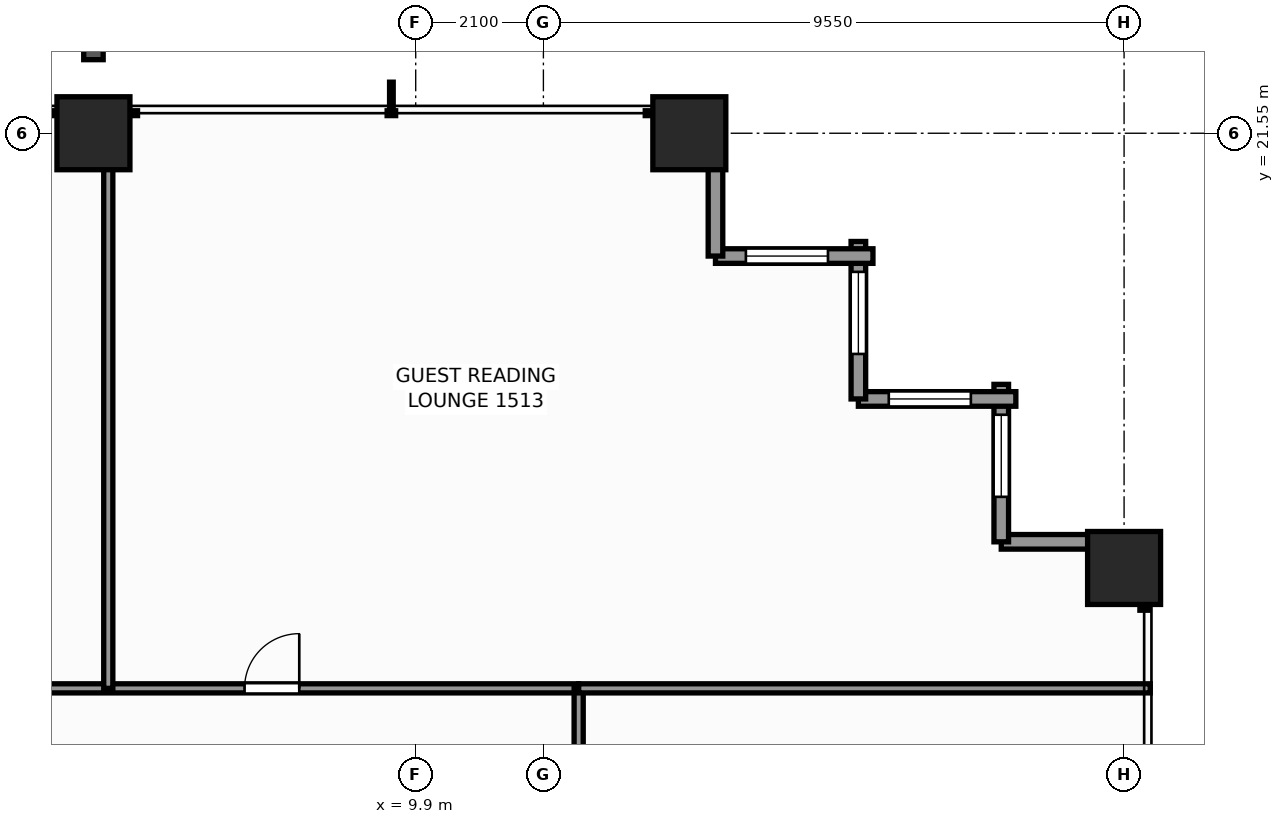
"""IFC4 building model, lengths in metres.
Left out: names, types, materials, properties, quantities, classifications, styles, units other than length and angle.
Written with IfcOpenShell. Run it as: python <this file> out.ifc"""

import sys

from ifc_helpers import new_model, si_unit, direction, frame, frame_2d, origin, origin_2d, place, context, subcontext, project, spatial, rectangle, extrude, element, fill, save


model = new_model("IFC4")
c1 = context("Model", 3, precision=1e-05, world=origin(), true_north=direction((0.0, 1.0)))
c2 = subcontext(c1, "Body", "Model", "MODEL_VIEW")
j1 = project(units=[si_unit("LENGTHUNIT", "METRE"), si_unit("PLANEANGLEUNIT", "RADIAN")], contexts=[c1])
p1 = place(None, origin())
s1 = spatial("IfcSite", under=j1, at=p1, CompositionType="ELEMENT")
p2 = place(p1, origin())
s2 = spatial("IfcBuilding", under=s1, at=p2, CompositionType="ELEMENT")
p3 = place(p2, frame((0.0, 0.0, 53.5)))
s3 = spatial("IfcBuildingStorey", under=s2, at=p3, CompositionType="ELEMENT", Elevation=53.5)
for number, where, z_axis, x_axis in (
    (1, (4.6, 21.55, 0.0), (0.0, 0.0, 1.0), (1.0, 0.0, 0.0)),
    (2, (14.4, 21.55, 0.0), (0.0, 0.0, 1.0), (1.0, 0.0, 0.0)),
    (3, (21.55, 14.4, 0.0), (0.0, 0.0, 1.0), (1.0, 0.0, 0.0)),
):
    element("IfcColumn", number, at=place(p3, frame(where, z_axis=z_axis, x_axis=x_axis)), inside=s3, PredefinedType="COLUMN", context=c2, shape_type="SweptSolid", body=[
        extrude(rectangle(XDim=1.2, YDim=1.2, at=origin_2d()), origin(), (0.0, 0.0, 1.0), 3.3),
    ])
p4 = place(p3, frame((19.53, 14.83, 0.0), z_axis=(0.0, 0.0, 1.0), x_axis=(1.0, 0.0, 0.0)))
e4 = element("IfcWall", 4, at=p4, inside=s3, PredefinedType="STANDARD", context=c2, shape_type="SweptSolid", body=[
    extrude(rectangle(XDim=2.59, YDim=0.24, at=frame_2d((1.295, 0.0))), origin(), (0.0, 0.0, 1.0), 2.439),
])
p5 = place(p3, frame((19.53, 17.42, 0.0), z_axis=(0.0, 0.0, 1.0), x_axis=(0.0, -1.0, 0.0)))
e5 = element("IfcWall", 5, at=p5, inside=s3, PredefinedType="STANDARD", context=c2, shape_type="SweptSolid", body=[
    extrude(rectangle(XDim=2.59, YDim=0.24, at=frame_2d((1.295, 0.0))), origin(), (0.0, 0.0, 1.0), 2.439),
])
p6 = place(p5, frame((0.5, 0.0, 0.65)))
e6 = element("IfcOpeningElement", 6, at=p6, cuts=e5, PredefinedType="OPENING", context=c2, shape_type="SweptSolid", body=[
    extrude(rectangle(XDim=1.35, YDim=1.55, at=frame_2d((0.675, 0.775))), frame((0.0, 0.13, 0.0), z_axis=(0.0, -1.0, 0.0), x_axis=(1.0, 0.0, 0.0)), (0.0, 0.0, 1.0), 0.26),
])
p7 = place(p3, frame((17.18, 17.18, 0.0), z_axis=(0.0, 0.0, 1.0), x_axis=(1.0, 0.0, 0.0)))
e7 = element("IfcWall", 7, at=p7, inside=s3, PredefinedType="STANDARD", context=c2, shape_type="SweptSolid", body=[
    extrude(rectangle(XDim=2.59, YDim=0.24, at=frame_2d((1.295, 0.0))), origin(), (0.0, 0.0, 1.0), 2.439),
])
p8 = place(p7, frame((0.5, 0.0, 0.65)))
e8 = element("IfcOpeningElement", 8, at=p8, cuts=e7, PredefinedType="OPENING", context=c2, shape_type="SweptSolid", body=[
    extrude(rectangle(XDim=1.35, YDim=1.55, at=frame_2d((0.675, 0.775))), frame((0.0, 0.13, 0.0), z_axis=(0.0, -1.0, 0.0), x_axis=(1.0, 0.0, 0.0)), (0.0, 0.0, 1.0), 0.26),
])
p9 = place(p3, frame((17.18, 19.77, 0.0), z_axis=(0.0, 0.0, 1.0), x_axis=(0.0, -1.0, 0.0)))
e9 = element("IfcWall", 9, at=p9, inside=s3, PredefinedType="STANDARD", context=c2, shape_type="SweptSolid", body=[
    extrude(rectangle(XDim=2.59, YDim=0.24, at=frame_2d((1.295, 0.0))), origin(), (0.0, 0.0, 1.0), 2.439),
])
p10 = place(p9, frame((0.5, 0.0, 0.65)))
e10 = element("IfcOpeningElement", 10, at=p10, cuts=e9, PredefinedType="OPENING", context=c2, shape_type="SweptSolid", body=[
    extrude(rectangle(XDim=1.35, YDim=1.55, at=frame_2d((0.675, 0.775))), frame((0.0, 0.13, 0.0), z_axis=(0.0, -1.0, 0.0), x_axis=(1.0, 0.0, 0.0)), (0.0, 0.0, 1.0), 0.26),
])
p11 = place(p3, frame((14.83, 19.53, 0.0), z_axis=(0.0, 0.0, 1.0), x_axis=(1.0, 0.0, 0.0)))
e11 = element("IfcWall", 11, at=p11, inside=s3, PredefinedType="STANDARD", context=c2, shape_type="SweptSolid", body=[
    extrude(rectangle(XDim=2.59, YDim=0.24, at=frame_2d((1.295, 0.0))), origin(), (0.0, 0.0, 1.0), 2.439),
])
p12 = place(p11, frame((0.5, 0.0, 0.65)))
e12 = element("IfcOpeningElement", 12, at=p12, cuts=e11, PredefinedType="OPENING", context=c2, shape_type="SweptSolid", body=[
    extrude(rectangle(XDim=1.35, YDim=1.55, at=frame_2d((0.675, 0.775))), frame((0.0, 0.13, 0.0), z_axis=(0.0, -1.0, 0.0), x_axis=(1.0, 0.0, 0.0)), (0.0, 0.0, 1.0), 0.26),
])
p13 = place(p3, frame((14.83, 22.12, 0.0), z_axis=(0.0, 0.0, 1.0), x_axis=(0.0, -1.0, 0.0)))
e13 = element("IfcWall", 13, at=p13, inside=s3, PredefinedType="STANDARD", context=c2, shape_type="SweptSolid", body=[
    extrude(rectangle(XDim=2.59, YDim=0.24, at=frame_2d((1.295, 0.0))), origin(), (0.0, 0.0, 1.0), 2.439),
])
p14 = place(p3, frame((-12.26, 12.42, 0.0), z_axis=(0.0, 0.0, 1.0), x_axis=(1.0, 0.0, 0.0)))
e14 = element("IfcWall", 14, at=p14, inside=s3, PredefinedType="PARTITIONING", context=c2, shape_type="SweptSolid", body=[
    extrude(rectangle(XDim=24.84, YDim=0.15, at=frame_2d((12.42, 0.0))), origin(), (0.0, 0.0, 1.0), 2.272),
])
p15 = place(p14, frame((3.979, 0.0, 0.0)))
e15 = element("IfcOpeningElement", 15, at=p15, cuts=e14, PredefinedType="OPENING", context=c2, shape_type="SweptSolid", body=[
    extrude(rectangle(XDim=0.9, YDim=2.06, at=frame_2d((0.45, 1.03))), frame((0.0, 0.085, 0.0), z_axis=(0.0, -1.0, 0.0), x_axis=(1.0, 0.0, 0.0)), (0.0, 0.0, 1.0), 0.17),
])
p16 = place(p14, frame((9.78, 0.0, 0.0)))
e16 = element("IfcOpeningElement", 16, at=p16, cuts=e14, PredefinedType="OPENING", context=c2, shape_type="SweptSolid", body=[
    extrude(rectangle(XDim=0.9, YDim=2.06, at=frame_2d((0.45, 1.03))), frame((0.0, 0.085, 0.0), z_axis=(0.0, -1.0, 0.0), x_axis=(1.0, 0.0, 0.0)), (0.0, 0.0, 1.0), 0.17),
])
p17 = place(p14, frame((19.345, 0.0, 0.0)))
e17 = element("IfcOpeningElement", 17, at=p17, cuts=e14, PredefinedType="OPENING", context=c2, shape_type="SweptSolid", body=[
    extrude(rectangle(XDim=0.9, YDim=2.06, at=frame_2d((0.45, 1.03))), frame((0.0, 0.085, 0.0), z_axis=(0.0, -1.0, 0.0), x_axis=(1.0, 0.0, 0.0)), (0.0, 0.0, 1.0), 0.17),
])
p18 = place(p3, frame((12.58, -12.42, 0.0), z_axis=(0.0, 0.0, 1.0), x_axis=(0.0, 1.0, 0.0)))
e18 = element("IfcWall", 18, at=p18, inside=s3, PredefinedType="PARTITIONING", context=c2, shape_type="SweptSolid", body=[
    extrude(rectangle(XDim=24.84, YDim=0.15, at=frame_2d((12.42, 0.0))), origin(), (0.0, 0.0, 1.0), 2.272),
])
p19 = place(p18, frame((3.542, 0.0, 0.0)))
e19 = element("IfcOpeningElement", 19, at=p19, cuts=e18, PredefinedType="OPENING", context=c2, shape_type="SweptSolid", body=[
    extrude(rectangle(XDim=0.9, YDim=2.06, at=frame_2d((0.45, 1.03))), frame((0.0, 0.085, 0.0), z_axis=(0.0, -1.0, 0.0), x_axis=(1.0, 0.0, 0.0)), (0.0, 0.0, 1.0), 0.17),
])
p20 = place(p18, frame((9.915, 0.0, 0.0)))
e20 = element("IfcOpeningElement", 20, at=p20, cuts=e18, PredefinedType="OPENING", context=c2, shape_type="SweptSolid", body=[
    extrude(rectangle(XDim=0.95, YDim=2.06, at=frame_2d((0.475, 1.03))), frame((0.0, 0.085, 0.0), z_axis=(0.0, -1.0, 0.0), x_axis=(1.0, 0.0, 0.0)), (0.0, 0.0, 1.0), 0.17),
])
p21 = place(p18, frame((19.505, 0.0, 0.0)))
e21 = element("IfcOpeningElement", 21, at=p21, cuts=e18, PredefinedType="OPENING", context=c2, shape_type="SweptSolid", body=[
    extrude(rectangle(XDim=0.9, YDim=2.06, at=frame_2d((0.45, 1.03))), frame((0.0, 0.085, 0.0), z_axis=(0.0, -1.0, 0.0), x_axis=(1.0, 0.0, 0.0)), (0.0, 0.0, 1.0), 0.17),
])
p22 = place(p3, frame((12.58, 12.42, 0.0), z_axis=(0.0, 0.0, 1.0), x_axis=(1.0, 0.0, 0.0)))
e22 = element("IfcWall", 22, at=p22, inside=s3, PredefinedType="PARTITIONING", context=c2, shape_type="SweptSolid", body=[
    extrude(rectangle(XDim=9.4, YDim=0.15, at=frame_2d((4.7, 0.0))), origin(), (0.0, 0.0, 1.0), 2.272),
])
p23 = place(p3, frame((4.844, 12.42, 0.0), z_axis=(0.0, 0.0, 1.0), x_axis=(0.0, 1.0, 0.0)))
e23 = element("IfcWall", 23, at=p23, inside=s3, PredefinedType="PARTITIONING", context=c2, shape_type="SweptSolid", body=[
    extrude(rectangle(XDim=9.56, YDim=0.15, at=frame_2d((4.78, 0.0))), origin(), (0.0, 0.0, 1.0), 2.272),
])
p24 = place(p6, origin())
e24 = element("IfcWindow", 24, at=p24, inside=s3, PartitioningType="SINGLE_PANEL", PredefinedType="WINDOW", context=c2, shape_type="SweptSolid", body=[
    extrude(rectangle(XDim=1.35, YDim=1.55, at=frame_2d((0.675, 0.775))), frame((0.0, 0.03, 0.0), z_axis=(0.0, -1.0, 0.0), x_axis=(1.0, 0.0, 0.0)), (0.0, 0.0, 1.0), 0.06),
])
fill(e6, e24)
p25 = place(p8, origin())
e25 = element("IfcWindow", 25, at=p25, inside=s3, PartitioningType="SINGLE_PANEL", PredefinedType="WINDOW", context=c2, shape_type="SweptSolid", body=[
    extrude(rectangle(XDim=1.35, YDim=1.55, at=frame_2d((0.675, 0.775))), frame((0.0, 0.03, 0.0), z_axis=(0.0, -1.0, 0.0), x_axis=(1.0, 0.0, 0.0)), (0.0, 0.0, 1.0), 0.06),
])
fill(e8, e25)
p26 = place(p10, origin())
e26 = element("IfcWindow", 26, at=p26, inside=s3, PartitioningType="SINGLE_PANEL", PredefinedType="WINDOW", context=c2, shape_type="SweptSolid", body=[
    extrude(rectangle(XDim=1.35, YDim=1.55, at=frame_2d((0.675, 0.775))), frame((0.0, 0.03, 0.0), z_axis=(0.0, -1.0, 0.0), x_axis=(1.0, 0.0, 0.0)), (0.0, 0.0, 1.0), 0.06),
])
fill(e10, e26)
p27 = place(p12, origin())
e27 = element("IfcWindow", 27, at=p27, inside=s3, PartitioningType="SINGLE_PANEL", PredefinedType="WINDOW", context=c2, shape_type="SweptSolid", body=[
    extrude(rectangle(XDim=1.35, YDim=1.55, at=frame_2d((0.675, 0.775))), frame((0.0, 0.03, 0.0), z_axis=(0.0, -1.0, 0.0), x_axis=(1.0, 0.0, 0.0)), (0.0, 0.0, 1.0), 0.06),
])
fill(e12, e27)
p28 = place(p17, origin())
e28 = element("IfcDoor", 28, at=p28, inside=s3, OperationType="SINGLE_SWING_RIGHT", PredefinedType="DOOR", context=c2, shape_type="SweptSolid", body=[
    extrude(rectangle(XDim=0.9, YDim=2.06, at=frame_2d((0.45, 1.03))), frame((0.0, 0.025, 0.0), z_axis=(0.0, -1.0, 0.0), x_axis=(1.0, 0.0, 0.0)), (0.0, 0.0, 1.0), 0.05),
])
fill(e17, e28)
save(model, sys.argv[1])
